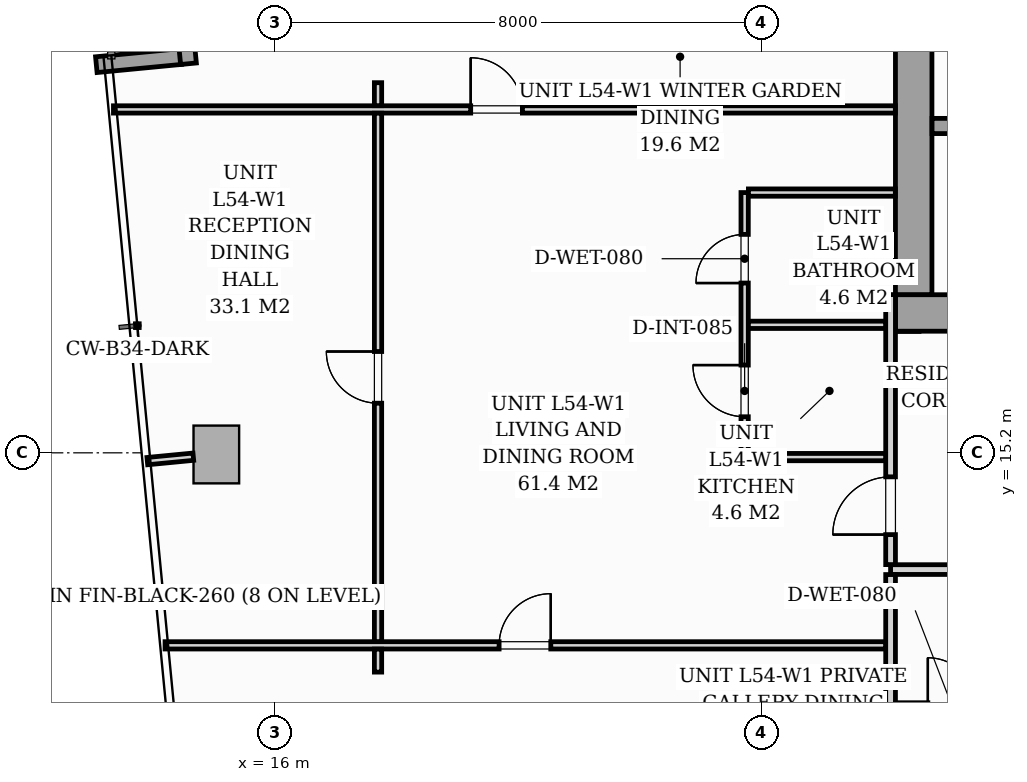
"""IFC4 building model, lengths in metres.
Left out: names, types, materials, properties, quantities, classifications, styles, units other than length and angle.
Written with IfcOpenShell. Run it as: python <this file> out.ifc"""

import sys

from ifc_helpers import new_model, si_unit, direction, frame, frame_2d, origin, origin_2d, place, context, subcontext, project, spatial, rectangle, i_section, extrude, source, transform, mapped, element, fill, save


model = new_model("IFC4")
c1 = context("Model", 3, precision=1e-05, world=origin(), true_north=direction((0.0, 1.0)))
c2 = subcontext(c1, "Body", "Model", "MODEL_VIEW")
j1 = project(units=[si_unit("LENGTHUNIT", "METRE"), si_unit("PLANEANGLEUNIT", "RADIAN")], contexts=[c1])
p1 = place(None, origin())
s1 = spatial("IfcSite", under=j1, at=p1, CompositionType="ELEMENT")
p2 = place(p1, origin())
s2 = spatial("IfcBuilding", under=s1, at=p2, CompositionType="ELEMENT")
p3 = place(p2, frame((0.0, 0.0, 189.0)))
s3 = spatial("IfcBuildingStorey", under=s2, at=p3, CompositionType="ELEMENT", Elevation=189.0)
m1 = source(origin(), c2, "Body", "SweptSolid", [
    extrude(i_section(OverallWidth=0.416, OverallDepth=0.446, WebThickness=0.039, FlangeThickness=0.063, FilletRadius=0.018, at=origin_2d()), origin(), (0.0, 0.0, 1.0), 3.196),
])
p4 = place(p3, frame((26.4, 17.4, 0.002), z_axis=(0.0, 0.0, 1.0), x_axis=(1.0, 0.0, 0.0)))
e1 = element("IfcColumn", 1, at=p4, inside=s3, PredefinedType="PILASTER", context=c2, shape_type="MappedRepresentation", body=[
    mapped(m1, transform((0.0, 0.0, 0.0), scale=1.0)),
])
m2 = source(origin(), c2, "Body", "SweptSolid", [
    extrude(rectangle(XDim=0.75, YDim=0.95, at=origin_2d()), origin(), (0.0, 0.0, 1.0), 3.196),
])
p5 = place(p3, frame((15.032, 15.173, 0.002), z_axis=(0.0, 0.0, 1.0), x_axis=(0.995396198367, 0.09584575252, 0.0)))
e2 = element("IfcColumn", 2, at=p5, inside=s3, PredefinedType="COLUMN", context=c2, shape_type="MappedRepresentation", body=[
    mapped(m2, transform((0.0, 0.0, 0.0), scale=1.0)),
])
p6 = place(p3, frame((13.058, 21.583, 0.0), z_axis=(0.0, 0.0, 1.0), x_axis=(0.99540774648, 0.095725744959, 0.0)))
e3 = element("IfcWall", 3, at=p6, inside=s3, PredefinedType="STANDARD", context=c2, shape_type="SweptSolid", body=[
    extrude(rectangle(XDim=1.395, YDim=0.26, at=frame_2d((0.698, 0.0))), origin(), (0.0, 0.0, 1.0), 2.94),
])
p7 = place(p3, frame((14.574, 21.599, 0.0), z_axis=(0.0, 0.0, 1.0), x_axis=(-0.095742423056, 0.99540614245, 0.0)))
e4 = element("IfcWall", 4, at=p7, inside=s3, PredefinedType="STANDARD", context=c2, shape_type="SweptSolid", body=[
    extrude(rectangle(XDim=1.395, YDim=0.26, at=frame_2d((0.697, 0.0))), origin(), (0.0, 0.0, 1.0), 2.94),
])
p8 = place(p3, frame((26.2, 17.5, 0.0), z_axis=(0.0, 0.0, 1.0), x_axis=(1.0, 0.0, 0.0)))
e5 = element("IfcWall", 5, at=p8, inside=s3, PredefinedType="SHEAR", context=c2, shape_type="SweptSolid", body=[
    extrude(rectangle(XDim=19.6, YDim=0.6, at=frame_2d((9.8, 0.0))), origin(), (0.0, 0.0, 1.0), 3.2),
])
p9 = place(p8, frame((0.95, 0.0, 0.0)))
e6 = element("IfcOpeningElement", 6, at=p9, cuts=e5, PredefinedType="OPENING", context=c2, shape_type="SweptSolid", body=[
    extrude(rectangle(XDim=0.95, YDim=2.06, at=frame_2d((0.475, 1.03))), frame((0.0, 0.31, 0.0), z_axis=(0.0, -1.0, 0.0), x_axis=(1.0, 0.0, 0.0)), (0.0, 0.0, 1.0), 0.62),
])
p10 = place(p8, frame((9.38, 0.0, 0.0)))
e7 = element("IfcOpeningElement", 7, at=p10, cuts=e5, PredefinedType="OPENING", context=c2, shape_type="SweptSolid", body=[
    extrude(rectangle(XDim=0.85, YDim=2.0, at=frame_2d((0.425, 1.0))), frame((0.0, 0.31, 0.0), z_axis=(0.0, -1.0, 0.0), x_axis=(1.0, 0.0, 0.0)), (0.0, 0.0, 1.0), 0.62),
])
p11 = place(p8, frame((17.55, 0.0, 0.0)))
e8 = element("IfcOpeningElement", 8, at=p11, cuts=e5, PredefinedType="OPENING", context=c2, shape_type="SweptSolid", body=[
    extrude(rectangle(XDim=0.95, YDim=2.06, at=frame_2d((0.475, 1.03))), frame((0.0, 0.31, 0.0), z_axis=(0.0, -1.0, 0.0), x_axis=(1.0, 0.0, 0.0)), (0.0, 0.0, 1.0), 0.62),
])
p12 = place(p3, frame((26.5, 17.802, 0.0), z_axis=(0.0, 0.0, 1.0), x_axis=(0.0, 1.0, 0.0)))
e9 = element("IfcWall", 9, at=p12, inside=s3, PredefinedType="SHEAR", context=c2, shape_type="SweptSolid", body=[
    extrude(rectangle(XDim=5.796, YDim=0.6, at=frame_2d((2.898, 0.0))), origin(), (0.0, 0.0, 1.0), 3.2),
])
p13 = place(p3, frame((26.802, 20.575, 0.0), z_axis=(0.0, 0.0, 1.0), x_axis=(1.0, 0.0, 0.0)))
e10 = element("IfcWall", 10, at=p13, inside=s3, PredefinedType="SOLIDWALL", context=c2, shape_type="SweptSolid", body=[
    extrude(rectangle(XDim=8.148, YDim=0.25, at=frame_2d((4.074, 0.0))), origin(), (0.0, 0.0, 1.0), 3.2),
])
p14 = place(p13, frame((0.298, 0.0, 0.0)))
e11 = element("IfcOpeningElement", 11, at=p14, cuts=e10, PredefinedType="OPENING", context=c2, shape_type="SweptSolid", body=[
    extrude(rectangle(XDim=0.95, YDim=2.06, at=frame_2d((0.475, 1.03))), frame((0.0, 0.135, 0.0), z_axis=(0.0, -1.0, 0.0), x_axis=(1.0, 0.0, 0.0)), (0.0, 0.0, 1.0), 0.27),
])
p15 = place(p3, frame((26.12, 13.28, 0.0), z_axis=(0.0, 0.0, 1.0), x_axis=(1.0, 0.0, 0.0)))
e12 = element("IfcWall", 12, at=p15, inside=s3, PredefinedType="PARTITIONING", context=c2, shape_type="SweptSolid", body=[
    extrude(rectangle(XDim=21.33, YDim=0.16, at=frame_2d((10.665, 0.0))), origin(), (0.0, 0.0, 1.0), 2.94),
])
p16 = place(p15, frame((4.704, 0.0, 0.0)))
e13 = element("IfcOpeningElement", 13, at=p16, cuts=e12, PredefinedType="OPENING", context=c2, shape_type="SweptSolid", body=[
    extrude(rectangle(XDim=0.95, YDim=2.06, at=frame_2d((0.475, 1.03))), frame((0.0, 0.09, 0.0), z_axis=(0.0, -1.0, 0.0), x_axis=(1.0, 0.0, 0.0)), (0.0, 0.0, 1.0), 0.18),
])
p17 = place(p15, frame((11.6, 0.0, 0.0)))
e14 = element("IfcOpeningElement", 14, at=p17, cuts=e12, PredefinedType="OPENING", context=c2, shape_type="SweptSolid", body=[
    extrude(rectangle(XDim=0.95, YDim=2.06, at=frame_2d((0.475, 1.03))), frame((0.0, 0.09, 0.0), z_axis=(0.0, -1.0, 0.0), x_axis=(1.0, 0.0, 0.0)), (0.0, 0.0, 1.0), 0.18),
])
p18 = place(p15, frame((14.976, 0.0, 0.0)))
e15 = element("IfcOpeningElement", 15, at=p18, cuts=e12, PredefinedType="OPENING", context=c2, shape_type="SweptSolid", body=[
    extrude(rectangle(XDim=0.95, YDim=2.06, at=frame_2d((0.475, 1.03))), frame((0.0, 0.09, 0.0), z_axis=(0.0, -1.0, 0.0), x_axis=(1.0, 0.0, 0.0)), (0.0, 0.0, 1.0), 0.18),
])
p19 = place(p3, frame((26.12, 7.261, 0.0), z_axis=(0.0, 0.0, 1.0), x_axis=(0.0, 1.0, 0.0)))
e16 = element("IfcWall", 16, at=p19, inside=s3, PredefinedType="PARTITIONING", context=c2, shape_type="SweptSolid", body=[
    extrude(rectangle(XDim=5.937, YDim=0.16, at=frame_2d((2.968, 0.0))), origin(), (0.0, 0.0, 1.0), 2.94),
])
p20 = place(p3, frame((26.12, 13.362, 0.0), z_axis=(0.0, 0.0, 1.0), x_axis=(0.0, 1.0, 0.0)))
e17 = element("IfcWall", 17, at=p20, inside=s3, PredefinedType="PARTITIONING", context=c2, shape_type="SweptSolid", body=[
    extrude(rectangle(XDim=4.44, YDim=0.16, at=frame_2d((2.22, 0.0))), origin(), (0.0, 0.0, 1.0), 2.94),
])
p21 = place(p20, frame((0.493, 0.0, 0.0)))
e18 = element("IfcOpeningElement", 18, at=p21, cuts=e17, PredefinedType="OPENING", context=c2, shape_type="SweptSolid", body=[
    extrude(rectangle(XDim=0.95, YDim=2.06, at=frame_2d((0.475, 1.03))), frame((0.0, 0.09, 0.0), z_axis=(0.0, -1.0, 0.0), x_axis=(1.0, 0.0, 0.0)), (0.0, 0.0, 1.0), 0.18),
])
p22 = place(p3, frame((23.72, 15.13, 0.0), z_axis=(0.0, 0.0, 1.0), x_axis=(0.0, 1.0, 0.0)))
e19 = element("IfcWall", 19, at=p22, inside=s3, PredefinedType="PARTITIONING", context=c2, shape_type="SweptSolid", body=[
    extrude(rectangle(XDim=4.35, YDim=0.12, at=frame_2d((2.175, 0.0))), origin(), (0.0, 0.0, 1.0), 2.94),
])
p23 = place(p22, frame((0.663, 0.0, 0.0)))
e20 = element("IfcOpeningElement", 20, at=p23, cuts=e19, PredefinedType="OPENING", context=c2, shape_type="SweptSolid", body=[
    extrude(rectangle(XDim=0.85, YDim=2.05, at=frame_2d((0.425, 1.025))), frame((0.0, 0.07, 0.0), z_axis=(0.0, -1.0, 0.0), x_axis=(1.0, 0.0, 0.0)), (0.0, 0.0, 1.0), 0.14),
])
p24 = place(p22, frame((2.862, 0.0, 0.0)))
e21 = element("IfcOpeningElement", 21, at=p24, cuts=e19, PredefinedType="OPENING", context=c2, shape_type="SweptSolid", body=[
    extrude(rectangle(XDim=0.8, YDim=2.02, at=frame_2d((0.4, 1.01))), frame((0.0, 0.07, 0.0), z_axis=(0.0, -1.0, 0.0), x_axis=(1.0, 0.0, 0.0)), (0.0, 0.0, 1.0), 0.14),
])
p25 = place(p3, frame((23.782, 17.305, 0.0), z_axis=(0.0, 0.0, 1.0), x_axis=(1.0, 0.0, 0.0)))
e22 = element("IfcWall", 22, at=p25, inside=s3, PredefinedType="PARTITIONING", context=c2, shape_type="SweptSolid", body=[
    extrude(rectangle(XDim=2.256, YDim=0.12, at=frame_2d((1.128, 0.0))), origin(), (0.0, 0.0, 1.0), 2.281),
])
p26 = place(p3, frame((23.782, 15.13, 0.0), z_axis=(0.0, 0.0, 1.0), x_axis=(1.0, 0.0, 0.0)))
e23 = element("IfcWall", 23, at=p26, inside=s3, PredefinedType="PARTITIONING", context=c2, shape_type="SweptSolid", body=[
    extrude(rectangle(XDim=2.256, YDim=0.12, at=frame_2d((1.128, 0.0))), origin(), (0.0, 0.0, 1.0), 2.94),
])
p27 = place(p3, frame((23.782, 19.48, 0.0), z_axis=(0.0, 0.0, 1.0), x_axis=(1.0, 0.0, 0.0)))
e24 = element("IfcWall", 24, at=p27, inside=s3, PredefinedType="PARTITIONING", context=c2, shape_type="SweptSolid", body=[
    extrude(rectangle(XDim=2.416, YDim=0.12, at=frame_2d((1.208, 0.0))), origin(), (0.0, 0.0, 1.0), 2.94),
])
p28 = place(p3, frame((14.189, 12.034, 0.0), z_axis=(0.0, 0.0, 1.0), x_axis=(1.0, 0.0, 0.0)))
e25 = element("IfcWall", 25, at=p28, inside=s3, PredefinedType="PARTITIONING", context=c2, shape_type="SweptSolid", body=[
    extrude(rectangle(XDim=11.849, YDim=0.12, at=frame_2d((5.925, 0.0))), origin(), (0.0, 0.0, 1.0), 2.94),
])
p29 = place(p28, frame((5.493, 0.0, 0.0)))
e26 = element("IfcOpeningElement", 26, at=p29, cuts=e25, PredefinedType="OPENING", context=c2, shape_type="SweptSolid", body=[
    extrude(rectangle(XDim=0.85, YDim=2.05, at=frame_2d((0.425, 1.025))), frame((0.0, 0.07, 0.0), z_axis=(0.0, -1.0, 0.0), x_axis=(1.0, 0.0, 0.0)), (0.0, 0.0, 1.0), 0.14),
])
p30 = place(p3, frame((13.34, 20.847, 0.0), z_axis=(0.0, 0.0, 1.0), x_axis=(1.0, 0.0, 0.0)))
e27 = element("IfcWall", 27, at=p30, inside=s3, PredefinedType="PARTITIONING", context=c2, shape_type="SweptSolid", body=[
    extrude(rectangle(XDim=12.858, YDim=0.12, at=frame_2d((6.429, 0.0))), origin(), (0.0, 0.0, 1.0), 2.94),
])
p31 = place(p30, frame((5.875, 0.0, 0.0)))
e28 = element("IfcOpeningElement", 28, at=p31, cuts=e27, PredefinedType="OPENING", context=c2, shape_type="SweptSolid", body=[
    extrude(rectangle(XDim=0.85, YDim=2.05, at=frame_2d((0.425, 1.025))), frame((0.0, 0.07, 0.0), z_axis=(0.0, -1.0, 0.0), x_axis=(1.0, 0.0, 0.0)), (0.0, 0.0, 1.0), 0.14),
])
p32 = place(p3, frame((17.691, 11.594, 0.0), z_axis=(0.0, 0.0, 1.0), x_axis=(0.0, 1.0, 0.0)))
e29 = element("IfcWall", 29, at=p32, inside=s3, PredefinedType="PARTITIONING", context=c2, shape_type="SweptSolid", body=[
    extrude(rectangle(XDim=0.378, YDim=0.12, at=frame_2d((0.189, 0.0))), origin(), (0.0, 0.0, 1.0), 2.94),
])
p33 = place(p3, frame((17.691, 12.096, 0.0), z_axis=(0.0, 0.0, 1.0), x_axis=(0.0, 1.0, 0.0)))
e30 = element("IfcWall", 30, at=p33, inside=s3, PredefinedType="PARTITIONING", context=c2, shape_type="SweptSolid", body=[
    extrude(rectangle(XDim=8.689, YDim=0.12, at=frame_2d((4.344, 0.0))), origin(), (0.0, 0.0, 1.0), 2.94),
])
p34 = place(p33, frame((3.92, 0.0, 0.0)))
e31 = element("IfcOpeningElement", 31, at=p34, cuts=e30, PredefinedType="OPENING", context=c2, shape_type="SweptSolid", body=[
    extrude(rectangle(XDim=0.85, YDim=2.05, at=frame_2d((0.425, 1.025))), frame((0.0, 0.07, 0.0), z_axis=(0.0, -1.0, 0.0), x_axis=(1.0, 0.0, 0.0)), (0.0, 0.0, 1.0), 0.14),
])
p35 = place(p3, frame((17.691, 20.909, 0.0), z_axis=(0.0, 0.0, 1.0), x_axis=(0.0, 1.0, 0.0)))
e32 = element("IfcWall", 32, at=p35, inside=s3, PredefinedType="PARTITIONING", context=c2, shape_type="SweptSolid", body=[
    extrude(rectangle(XDim=0.378, YDim=0.12, at=frame_2d((0.189, 0.0))), origin(), (0.0, 0.0, 1.0), 2.94),
])
p36 = place(p3, frame((14.654, 15.136, 0.0), z_axis=(0.0, 0.0, 1.0), x_axis=(-0.995408440582, -0.095718527039, 0.0)))
e33 = element("IfcWall", 33, at=p36, inside=s3, PredefinedType="PARTITIONING", context=c2, shape_type="SweptSolid", body=[
    extrude(rectangle(XDim=0.76, YDim=0.12, at=frame_2d((0.38, 0.0))), origin(), (0.0, 0.0, 1.0), 2.94),
])
m3 = source(origin(), c2, "Body", "SweptSolid", [
    extrude(rectangle(XDim=0.95, YDim=2.06, at=frame_2d((0.475, 1.03))), frame((0.0, 0.025, 0.0), z_axis=(0.0, -1.0, 0.0), x_axis=(1.0, 0.0, 0.0)), (0.0, 0.0, 1.0), 0.05),
])
p37 = place(p21, origin())
e34 = element("IfcDoor", 34, at=p37, inside=s3, OperationType="SINGLE_SWING_LEFT", PredefinedType="DOOR", context=c2, shape_type="MappedRepresentation", body=[
    mapped(m3, transform((0.0, 0.0, 0.0), scale=1.0)),
])
fill(e18, e34)
m4 = source(origin(), c2, "Body", "SweptSolid", [
    extrude(rectangle(XDim=0.85, YDim=2.05, at=frame_2d((0.425, 1.025))), frame((0.0, 0.025, 0.0), z_axis=(0.0, -1.0, 0.0), x_axis=(1.0, 0.0, 0.0)), (0.0, 0.0, 1.0), 0.05),
])
p38 = place(p23, origin())
e35 = element("IfcDoor", 35, at=p38, inside=s3, OperationType="SINGLE_SWING_RIGHT", PredefinedType="DOOR", context=c2, shape_type="MappedRepresentation", body=[
    mapped(m4, transform((0.0, 0.0, 0.0), scale=1.0)),
])
fill(e20, e35)
m5 = source(origin(), c2, "Body", "SweptSolid", [
    extrude(rectangle(XDim=0.8, YDim=2.02, at=frame_2d((0.4, 1.01))), frame((0.0, 0.025, 0.0), z_axis=(0.0, -1.0, 0.0), x_axis=(1.0, 0.0, 0.0)), (0.0, 0.0, 1.0), 0.05),
])
p39 = place(p24, origin())
e36 = element("IfcDoor", 36, at=p39, inside=s3, OperationType="SINGLE_SWING_LEFT", PredefinedType="DOOR", context=c2, shape_type="MappedRepresentation", body=[
    mapped(m5, transform((0.0, 0.0, 0.0), scale=1.0)),
])
fill(e21, e36)
p40 = place(p29, origin())
e37 = element("IfcDoor", 37, at=p40, inside=s3, OperationType="SINGLE_SWING_RIGHT", PredefinedType="DOOR", context=c2, shape_type="MappedRepresentation", body=[
    mapped(m4, transform((0.0, 0.0, 0.0), scale=1.0)),
])
fill(e26, e37)
p41 = place(p31, origin())
e38 = element("IfcDoor", 38, at=p41, inside=s3, OperationType="SINGLE_SWING_LEFT", PredefinedType="DOOR", context=c2, shape_type="MappedRepresentation", body=[
    mapped(m4, transform((0.0, 0.0, 0.0), scale=1.0)),
])
fill(e28, e38)
p42 = place(p34, origin())
e39 = element("IfcDoor", 39, at=p42, inside=s3, OperationType="SINGLE_SWING_RIGHT", PredefinedType="DOOR", context=c2, shape_type="MappedRepresentation", body=[
    mapped(m4, transform((0.0, 0.0, 0.0), scale=1.0)),
])
fill(e31, e39)
save(model, sys.argv[1])
